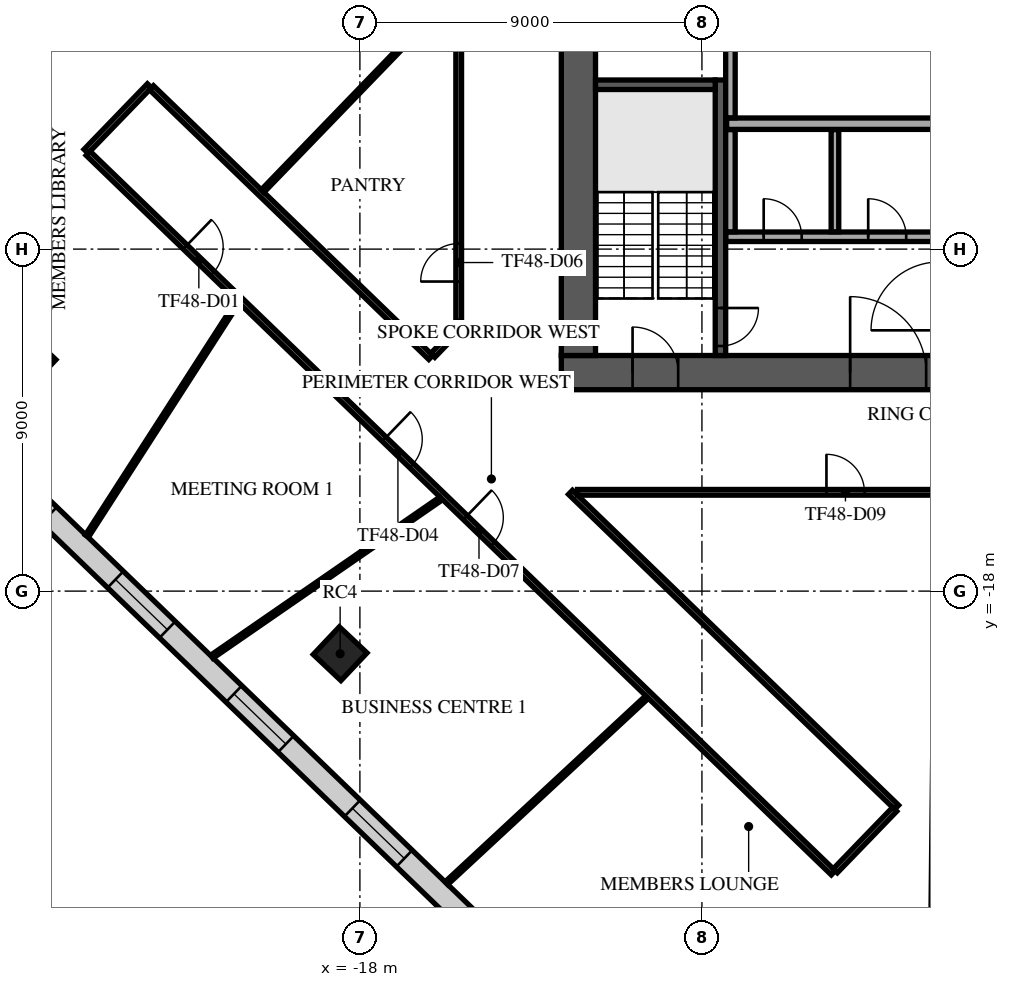
"""IFC4 building model, lengths in metres.
Left out: names, types, materials, properties, quantities, classifications, styles, units other than length and angle.
Written with IfcOpenShell. Run it as: python <this file> out.ifc"""

import sys

from ifc_helpers import new_model, si_unit, direction, frame, frame_2d, origin, origin_2d, place, context, subcontext, project, spatial, rectangle, extrude, element, fill, save


model = new_model("IFC4")
c1 = context("Model", 3, precision=1e-05, world=origin(), true_north=direction((0.0, 1.0)))
c2 = subcontext(c1, "Body", "Model", "MODEL_VIEW")
j1 = project(units=[si_unit("LENGTHUNIT", "METRE"), si_unit("PLANEANGLEUNIT", "RADIAN")], contexts=[c1])
p1 = place(None, origin())
s1 = spatial("IfcSite", under=j1, at=p1, CompositionType="ELEMENT")
p2 = place(p1, origin())
s2 = spatial("IfcBuilding", under=s1, at=p2, CompositionType="ELEMENT")
p3 = place(p2, frame((0.0, 0.0, 205.3)))
s3 = spatial("IfcBuildingStorey", under=s2, at=p3, CompositionType="ELEMENT", Elevation=205.3)
for number, where, z_axis, x_axis in (
    (1, (-26.706, -11.931, 0.0), (0.0, 0.0, 1.0), (0.686, 0.728, 0.0)),
    (2, (-18.52, -19.647, 0.0), (0.0, 0.0, 1.0), (0.686, 0.728, 0.0)),
):
    element("IfcColumn", number, at=place(p3, frame(where, z_axis=z_axis, x_axis=x_axis)), inside=s3, PredefinedType="COLUMN", context=c2, shape_type="SweptSolid", body=[
        extrude(rectangle(XDim=1.0, YDim=1.0, at=origin_2d()), origin(), (0.0, 0.0, 1.0), 4.0),
    ])
p4 = place(p3, frame((-12.7, -12.25, 0.0), z_axis=(0.0, 0.0, 1.0), x_axis=(1.0, 0.0, 0.0)))
e3 = element("IfcWall", 3, at=p4, inside=s3, PredefinedType="SHEAR", context=c2, shape_type="SweptSolid", body=[
    extrude(rectangle(XDim=25.4, YDim=0.9, at=frame_2d((12.7, 0.0))), origin(), (0.0, 0.0, 1.0), 3.62),
])
p5 = place(p4, frame((7.6, 0.0, 0.0)))
e4 = element("IfcOpeningElement", 4, at=p5, cuts=e3, PredefinedType="OPENING", context=c2, shape_type="SweptSolid", body=[
    extrude(rectangle(XDim=2.0, YDim=2.1, at=frame_2d((1.0, 1.05))), frame((0.0, 0.46, 0.0), z_axis=(0.0, -1.0, 0.0), x_axis=(1.0, 0.0, 0.0)), (0.0, 0.0, 1.0), 0.92),
])
p6 = place(p4, frame((17.725, 0.0, 0.0)))
e5 = element("IfcOpeningElement", 5, at=p6, cuts=e3, PredefinedType="OPENING", context=c2, shape_type="SweptSolid", body=[
    extrude(rectangle(XDim=1.2, YDim=2.1, at=frame_2d((0.6, 1.05))), frame((0.0, 0.46, 0.0), z_axis=(0.0, -1.0, 0.0), x_axis=(1.0, 0.0, 0.0)), (0.0, 0.0, 1.0), 0.92),
])
p7 = place(p4, frame((1.875, 0.0, 0.0)))
e6 = element("IfcOpeningElement", 6, at=p7, cuts=e3, PredefinedType="OPENING", context=c2, shape_type="SweptSolid", body=[
    extrude(rectangle(XDim=1.2, YDim=2.1, at=frame_2d((0.6, 1.05))), frame((0.0, 0.46, 0.0), z_axis=(0.0, -1.0, 0.0), x_axis=(1.0, 0.0, 0.0)), (0.0, 0.0, 1.0), 0.92),
])
p8 = place(p4, frame((22.325, 0.0, 0.0)))
e7 = element("IfcOpeningElement", 7, at=p8, cuts=e3, PredefinedType="OPENING", context=c2, shape_type="SweptSolid", body=[
    extrude(rectangle(XDim=1.2, YDim=2.1, at=frame_2d((0.6, 1.05))), frame((0.0, 0.46, 0.0), z_axis=(0.0, -1.0, 0.0), x_axis=(1.0, 0.0, 0.0)), (0.0, 0.0, 1.0), 0.92),
])
p9 = place(p3, frame((-12.25, -11.8, 0.0), z_axis=(0.0, 0.0, 1.0), x_axis=(0.0, 1.0, 0.0)))
e8 = element("IfcWall", 8, at=p9, inside=s3, PredefinedType="SHEAR", context=c2, shape_type="SweptSolid", body=[
    extrude(rectangle(XDim=23.6, YDim=0.9, at=frame_2d((11.8, 0.0))), origin(), (0.0, 0.0, 1.0), 3.62),
])
p10 = place(p9, frame((10.6, 0.0, 0.0)))
e9 = element("IfcOpeningElement", 9, at=p10, cuts=e8, PredefinedType="OPENING", context=c2, shape_type="SweptSolid", body=[
    extrude(rectangle(XDim=2.4, YDim=2.4, at=frame_2d((1.2, 1.2))), frame((0.0, 0.46, 0.0), z_axis=(0.0, -1.0, 0.0), x_axis=(1.0, 0.0, 0.0)), (0.0, 0.0, 1.0), 0.92),
])
p11 = place(p3, frame((-8.512, -4.55, 0.0), z_axis=(0.0, 0.0, 1.0), x_axis=(0.0, -1.0, 0.0)))
e10 = element("IfcWall", 10, at=p11, inside=s3, PredefinedType="SOLIDWALL", context=c2, shape_type="SweptSolid", body=[
    extrude(rectangle(XDim=7.25, YDim=0.275, at=frame_2d((3.625, 0.0))), origin(), (0.0, 0.0, 1.0), 3.62),
])
p12 = place(p11, frame((6.0, 0.0, 0.0)))
e11 = element("IfcOpeningElement", 11, at=p12, cuts=e10, PredefinedType="OPENING", context=c2, shape_type="SweptSolid", body=[
    extrude(rectangle(XDim=1.0, YDim=2.1, at=frame_2d((0.5, 1.05))), frame((0.0, 0.147, 0.0), z_axis=(0.0, -1.0, 0.0), x_axis=(1.0, 0.0, 0.0)), (0.0, 0.0, 1.0), 0.295),
])
p13 = place(p3, frame((-8.65, -4.675, 0.0), z_axis=(0.0, 0.0, 1.0), x_axis=(-1.0, 0.0, 0.0)))
e12 = element("IfcWall", 12, at=p13, inside=s3, PredefinedType="SOLIDWALL", context=c2, shape_type="SweptSolid", body=[
    extrude(rectangle(XDim=3.15, YDim=0.25, at=frame_2d((1.575, 0.0))), origin(), (0.0, 0.0, 1.0), 3.62),
])
p14 = place(p3, frame((-8.37, -8.675, 0.0), z_axis=(0.0, 0.0, 1.0), x_axis=(1.0, 0.0, 0.0)))
e13 = element("IfcWall", 13, at=p14, inside=s3, PredefinedType="PARTITIONING", context=c2, shape_type="SweptSolid", body=[
    extrude(rectangle(XDim=5.49, YDim=0.25, at=frame_2d((2.745, 0.0))), origin(), (0.0, 0.0, 1.0), 3.62),
])
p15 = place(p14, frame((0.995, 0.0, 0.0)))
e14 = element("IfcOpeningElement", 14, at=p15, cuts=e13, PredefinedType="OPENING", context=c2, shape_type="SweptSolid", body=[
    extrude(rectangle(XDim=1.0, YDim=2.1, at=frame_2d((0.5, 1.05))), frame((0.0, 0.135, 0.0), z_axis=(0.0, -1.0, 0.0), x_axis=(1.0, 0.0, 0.0)), (0.0, 0.0, 1.0), 0.27),
])
p16 = place(p14, frame((3.745, 0.0, 0.0)))
e15 = element("IfcOpeningElement", 15, at=p16, cuts=e13, PredefinedType="OPENING", context=c2, shape_type="SweptSolid", body=[
    extrude(rectangle(XDim=1.0, YDim=2.1, at=frame_2d((0.5, 1.05))), frame((0.0, 0.135, 0.0), z_axis=(0.0, -1.0, 0.0), x_axis=(1.0, 0.0, 0.0)), (0.0, 0.0, 1.0), 0.27),
])
p17 = place(p3, frame((-8.25, -8.545, 0.0), z_axis=(0.0, 0.0, 1.0), x_axis=(0.0, 1.0, 0.0)))
e16 = element("IfcWall", 16, at=p17, inside=s3, PredefinedType="PARTITIONING", context=c2, shape_type="SweptSolid", body=[
    extrude(rectangle(XDim=2.69, YDim=0.25, at=frame_2d((1.345, 0.0))), origin(), (0.0, 0.0, 1.0), 3.62),
])
p18 = place(p3, frame((-5.5, -8.545, 0.0), z_axis=(0.0, 0.0, 1.0), x_axis=(0.0, 1.0, 0.0)))
e17 = element("IfcWall", 17, at=p18, inside=s3, PredefinedType="PARTITIONING", context=c2, shape_type="SweptSolid", body=[
    extrude(rectangle(XDim=2.69, YDim=0.2, at=frame_2d((1.345, 0.0))), origin(), (0.0, 0.0, 1.0), 3.62),
])
p19 = place(p3, frame((-8.35, -5.7, 0.0), z_axis=(0.0, 0.0, 1.0), x_axis=(1.0, 0.0, 0.0)))
e18 = element("IfcWall", 18, at=p19, inside=s3, PredefinedType="PARTITIONING", context=c2, shape_type="SweptSolid", body=[
    extrude(rectangle(XDim=5.47, YDim=0.3, at=frame_2d((2.735, 0.0))), origin(), (0.0, 0.0, 1.0), 3.62),
])
p20 = place(p3, frame((-8.25, -5.545, 0.0), z_axis=(0.0, 0.0, 1.0), x_axis=(0.0, 1.0, 0.0)))
e19 = element("IfcWall", 19, at=p20, inside=s3, PredefinedType="PARTITIONING", context=c2, shape_type="SweptSolid", body=[
    extrude(rectangle(XDim=2.69, YDim=0.25, at=frame_2d((1.345, 0.0))), origin(), (0.0, 0.0, 1.0), 3.62),
])
p21 = place(p3, frame((-34.658, -7.819, 0.0), z_axis=(0.0, 0.0, 1.0), x_axis=(0.719340729741, -0.694657408034, 0.0)))
e20 = element("IfcWall", 20, at=p21, inside=s3, PredefinedType="STANDARD", context=c2, shape_type="SweptSolid", body=[
    extrude(rectangle(XDim=39.0, YDim=0.6, at=frame_2d((19.5, 0.0))), origin(), (0.0, 0.0, 1.0), 3.62),
])
p22 = place(p21, frame((1.217, 0.0, 0.9)))
e21 = element("IfcOpeningElement", 21, at=p22, cuts=e20, PredefinedType="OPENING", context=c2, shape_type="SweptSolid", body=[
    extrude(rectangle(XDim=1.9, YDim=2.1, at=frame_2d((0.95, 1.05))), frame((0.0, 0.31, 0.0), z_axis=(0.0, -1.0, 0.0), x_axis=(1.0, 0.0, 0.0)), (0.0, 0.0, 1.0), 0.62),
])
p23 = place(p21, frame((5.55, 0.0, 0.9)))
e22 = element("IfcOpeningElement", 22, at=p23, cuts=e20, PredefinedType="OPENING", context=c2, shape_type="SweptSolid", body=[
    extrude(rectangle(XDim=1.9, YDim=2.1, at=frame_2d((0.95, 1.05))), frame((0.0, 0.31, 0.0), z_axis=(0.0, -1.0, 0.0), x_axis=(1.0, 0.0, 0.0)), (0.0, 0.0, 1.0), 0.62),
])
p24 = place(p21, frame((9.883, 0.0, 0.9)))
e23 = element("IfcOpeningElement", 23, at=p24, cuts=e20, PredefinedType="OPENING", context=c2, shape_type="SweptSolid", body=[
    extrude(rectangle(XDim=1.9, YDim=2.1, at=frame_2d((0.95, 1.05))), frame((0.0, 0.31, 0.0), z_axis=(0.0, -1.0, 0.0), x_axis=(1.0, 0.0, 0.0)), (0.0, 0.0, 1.0), 0.62),
])
p25 = place(p21, frame((14.217, 0.0, 0.9)))
e24 = element("IfcOpeningElement", 24, at=p25, cuts=e20, PredefinedType="OPENING", context=c2, shape_type="SweptSolid", body=[
    extrude(rectangle(XDim=1.9, YDim=2.1, at=frame_2d((0.95, 1.05))), frame((0.0, 0.31, 0.0), z_axis=(0.0, -1.0, 0.0), x_axis=(1.0, 0.0, 0.0)), (0.0, 0.0, 1.0), 0.62),
])
p26 = place(p21, frame((18.55, 0.0, 0.9)))
e25 = element("IfcOpeningElement", 25, at=p26, cuts=e20, PredefinedType="OPENING", context=c2, shape_type="SweptSolid", body=[
    extrude(rectangle(XDim=1.9, YDim=2.1, at=frame_2d((0.95, 1.05))), frame((0.0, 0.31, 0.0), z_axis=(0.0, -1.0, 0.0), x_axis=(1.0, 0.0, 0.0)), (0.0, 0.0, 1.0), 0.62),
])
p27 = place(p21, frame((22.883, 0.0, 0.9)))
e26 = element("IfcOpeningElement", 26, at=p27, cuts=e20, PredefinedType="OPENING", context=c2, shape_type="SweptSolid", body=[
    extrude(rectangle(XDim=1.9, YDim=2.1, at=frame_2d((0.95, 1.05))), frame((0.0, 0.31, 0.0), z_axis=(0.0, -1.0, 0.0), x_axis=(1.0, 0.0, 0.0)), (0.0, 0.0, 1.0), 0.62),
])
p28 = place(p21, frame((27.217, 0.0, 0.9)))
e27 = element("IfcOpeningElement", 27, at=p28, cuts=e20, PredefinedType="OPENING", context=c2, shape_type="SweptSolid", body=[
    extrude(rectangle(XDim=1.9, YDim=2.1, at=frame_2d((0.95, 1.05))), frame((0.0, 0.31, 0.0), z_axis=(0.0, -1.0, 0.0), x_axis=(1.0, 0.0, 0.0)), (0.0, 0.0, 1.0), 0.62),
])
p29 = place(p21, frame((31.55, 0.0, 0.9)))
e28 = element("IfcOpeningElement", 28, at=p29, cuts=e20, PredefinedType="OPENING", context=c2, shape_type="SweptSolid", body=[
    extrude(rectangle(XDim=1.9, YDim=2.1, at=frame_2d((0.95, 1.05))), frame((0.0, 0.31, 0.0), z_axis=(0.0, -1.0, 0.0), x_axis=(1.0, 0.0, 0.0)), (0.0, 0.0, 1.0), 0.62),
])
p30 = place(p21, frame((35.883, 0.0, 0.9)))
e29 = element("IfcOpeningElement", 29, at=p30, cuts=e20, PredefinedType="OPENING", context=c2, shape_type="SweptSolid", body=[
    extrude(rectangle(XDim=1.9, YDim=2.1, at=frame_2d((0.95, 1.05))), frame((0.0, 0.31, 0.0), z_axis=(0.0, -1.0, 0.0), x_axis=(1.0, 0.0, 0.0)), (0.0, 0.0, 1.0), 0.62),
])
p31 = place(p3, frame((-25.205, -6.427, 0.0), z_axis=(0.0, 0.0, 1.0), x_axis=(0.694688923552, 0.719310294305, 0.0)))
e30 = element("IfcWall", 30, at=p31, inside=s3, PredefinedType="PARTITIONING", context=c2, shape_type="SweptSolid", body=[
    extrude(rectangle(XDim=2.4, YDim=0.15, at=frame_2d((1.2, 0.0))), origin(), (0.0, 0.0, 1.0), 3.62),
])
p32 = place(p3, frame((-25.151, -6.479, 0.0), z_axis=(0.0, 0.0, 1.0), x_axis=(0.719341269489, -0.694656849106, 0.0)))
e31 = element("IfcWall", 31, at=p32, inside=s3, PredefinedType="PARTITIONING", context=c2, shape_type="SweptSolid", body=[
    extrude(rectangle(XDim=27.258, YDim=0.15, at=frame_2d((13.629, 0.0))), origin(), (0.0, 0.0, 1.0), 3.17),
])
p33 = place(p32, frame((3.55, 0.0, 0.0)))
e32 = element("IfcOpeningElement", 32, at=p33, cuts=e31, PredefinedType="OPENING", context=c2, shape_type="SweptSolid", body=[
    extrude(rectangle(XDim=1.0, YDim=2.1, at=frame_2d((0.5, 1.05))), frame((0.0, 0.085, 0.0), z_axis=(0.0, -1.0, 0.0), x_axis=(1.0, 0.0, 0.0)), (0.0, 0.0, 1.0), 0.17),
])
p34 = place(p32, frame((10.832, 0.0, 0.0)))
e33 = element("IfcOpeningElement", 33, at=p34, cuts=e31, PredefinedType="OPENING", context=c2, shape_type="SweptSolid", body=[
    extrude(rectangle(XDim=1.0, YDim=2.1, at=frame_2d((0.5, 1.05))), frame((0.0, 0.085, 0.0), z_axis=(0.0, -1.0, 0.0), x_axis=(1.0, 0.0, 0.0)), (0.0, 0.0, 1.0), 0.17),
])
p35 = place(p32, frame((13.797, 0.0, 0.0)))
e34 = element("IfcOpeningElement", 34, at=p35, cuts=e31, PredefinedType="OPENING", context=c2, shape_type="SweptSolid", body=[
    extrude(rectangle(XDim=1.0, YDim=2.1, at=frame_2d((0.5, 1.05))), frame((0.0, 0.085, 0.0), z_axis=(0.0, -1.0, 0.0), x_axis=(1.0, 0.0, 0.0)), (0.0, 0.0, 1.0), 0.17),
])
p36 = place(p3, frame((-23.484, -4.753, 0.0), z_axis=(0.0, 0.0, 1.0), x_axis=(0.719330221059, -0.694668289956, 0.0)))
e35 = element("IfcWall", 35, at=p36, inside=s3, PredefinedType="PARTITIONING", context=c2, shape_type="SweptSolid", body=[
    extrude(rectangle(XDim=10.216, YDim=0.15, at=frame_2d((5.108, 0.0))), origin(), (0.0, 0.0, 1.0), 3.17),
])
p37 = place(p3, frame((-16.083, -11.796, 0.0), z_axis=(0.0, 0.0, 1.0), x_axis=(0.694957895629, 0.719050431682, 0.0)))
e36 = element("IfcWall", 36, at=p37, inside=s3, PredefinedType="PARTITIONING", context=c2, shape_type="SweptSolid", body=[
    extrude(rectangle(XDim=0.983, YDim=0.15, at=frame_2d((0.491, 0.0))), origin(), (0.0, 0.0, 1.0), 3.17),
])
p38 = place(p3, frame((-15.4, -10.903, 0.0), z_axis=(0.0, 0.0, 1.0), x_axis=(0.0, 1.0, 0.0)))
e37 = element("IfcWall", 37, at=p38, inside=s3, PredefinedType="PARTITIONING", context=c2, shape_type="SweptSolid", body=[
    extrude(rectangle(XDim=19.403, YDim=0.15, at=frame_2d((9.702, 0.0))), origin(), (0.0, 0.0, 1.0), 3.17),
])
p39 = place(p38, frame((15.032, 0.0, 0.0)))
e38 = element("IfcOpeningElement", 38, at=p39, cuts=e37, PredefinedType="OPENING", context=c2, shape_type="SweptSolid", body=[
    extrude(rectangle(XDim=1.0, YDim=2.1, at=frame_2d((0.5, 1.05))), frame((0.0, 0.085, 0.0), z_axis=(0.0, -1.0, 0.0), x_axis=(1.0, 0.0, 0.0)), (0.0, 0.0, 1.0), 0.17),
])
p40 = place(p38, frame((1.05, 0.0, 0.0)))
e39 = element("IfcOpeningElement", 39, at=p40, cuts=e37, PredefinedType="OPENING", context=c2, shape_type="SweptSolid", body=[
    extrude(rectangle(XDim=1.0, YDim=2.1, at=frame_2d((0.5, 1.05))), frame((0.0, 0.085, 0.0), z_axis=(0.0, -1.0, 0.0), x_axis=(1.0, 0.0, 0.0)), (0.0, 0.0, 1.0), 0.17),
])
p41 = place(p3, frame((-12.459, -15.4, 0.0), z_axis=(0.0, 0.0, 1.0), x_axis=(0.719357740032, -0.694639792883, 0.0)))
e40 = element("IfcWall", 40, at=p41, inside=s3, PredefinedType="PARTITIONING", context=c2, shape_type="SweptSolid", body=[
    extrude(rectangle(XDim=11.931, YDim=0.15, at=frame_2d((5.966, 0.0))), origin(), (0.0, 0.0, 1.0), 3.17),
])
p42 = place(p3, frame((-12.273, -15.4, 0.0), z_axis=(0.0, 0.0, 1.0), x_axis=(1.0, 0.0, 0.0)))
e41 = element("IfcWall", 41, at=p42, inside=s3, PredefinedType="PARTITIONING", context=c2, shape_type="SweptSolid", body=[
    extrude(rectangle(XDim=18.423, YDim=0.15, at=frame_2d((9.212, 0.0))), origin(), (0.0, 0.0, 1.0), 3.17),
])
p43 = place(p42, frame((6.55, 0.0, 0.0)))
e42 = element("IfcOpeningElement", 42, at=p43, cuts=e41, PredefinedType="OPENING", context=c2, shape_type="SweptSolid", body=[
    extrude(rectangle(XDim=1.0, YDim=2.1, at=frame_2d((0.5, 1.05))), frame((0.0, 0.085, 0.0), z_axis=(0.0, -1.0, 0.0), x_axis=(1.0, 0.0, 0.0)), (0.0, 0.0, 1.0), 0.17),
])
p44 = place(p3, frame((-5.491, -25.36, 0.0), z_axis=(0.0, 0.0, 1.0), x_axis=(0.694737811608, 0.719263076435, 0.0)))
e43 = element("IfcWall", 43, at=p44, inside=s3, PredefinedType="PARTITIONING", context=c2, shape_type="SweptSolid", body=[
    extrude(rectangle(XDim=2.25, YDim=0.15, at=frame_2d((1.125, 0.0))), origin(), (0.0, 0.0, 1.0), 3.17),
])
p45 = place(p3, frame((-25.182, -16.55, 0.0), z_axis=(0.0, 0.0, 1.0), x_axis=(0.541323767844, 0.84081423535, 0.0)))
e44 = element("IfcWall", 44, at=p45, inside=s3, PredefinedType="PARTITIONING", context=c2, shape_type="SweptSolid", body=[
    extrude(rectangle(XDim=7.321, YDim=0.1, at=frame_2d((3.661, 0.0))), origin(), (0.0, 0.0, 1.0), 2.97),
])
p46 = place(p3, frame((-21.894, -19.725, 0.0), z_axis=(0.0, 0.0, 1.0), x_axis=(0.822893560883, 0.568195553887, 0.0)))
e45 = element("IfcWall", 45, at=p46, inside=s3, PredefinedType="PARTITIONING", context=c2, shape_type="SweptSolid", body=[
    extrude(rectangle(XDim=7.324, YDim=0.1, at=frame_2d((3.662, 0.0))), origin(), (0.0, 0.0, 1.0), 2.97),
])
p47 = place(p3, frame((-20.56, -7.472, 0.0), z_axis=(0.0, 0.0, 1.0), x_axis=(0.694721601458, 0.719278733502, 0.0)))
e46 = element("IfcWall", 46, at=p47, inside=s3, PredefinedType="PARTITIONING", context=c2, shape_type="SweptSolid", body=[
    extrude(rectangle(XDim=7.267, YDim=0.1, at=frame_2d((3.634, 0.0))), origin(), (0.0, 0.0, 1.0), 3.17),
])
p48 = place(p3, frame((-15.722, -25.685, 0.0), z_axis=(0.0, 0.0, 1.0), x_axis=(0.732967408974, 0.680263755747, 0.0)))
e47 = element("IfcWall", 47, at=p48, inside=s3, PredefinedType="PARTITIONING", context=c2, shape_type="SweptSolid", body=[
    extrude(rectangle(XDim=7.199, YDim=0.1, at=frame_2d((3.599, 0.0))), origin(), (0.0, 0.0, 1.0), 2.97),
])
p49 = place(p3, frame((-2.975, -31.21, 0.0), z_axis=(0.0, 0.0, 1.0), x_axis=(0.010798774474, 0.999941691535, 0.0)))
e48 = element("IfcWall", 48, at=p49, inside=s3, PredefinedType="PARTITIONING", context=c2, shape_type="SweptSolid", body=[
    extrude(rectangle(XDim=15.735, YDim=0.1, at=frame_2d((7.868, 0.0))), origin(), (0.0, 0.0, 1.0), 2.97),
])
p50 = place(p5, origin())
e49 = element("IfcDoor", 49, at=p50, inside=s3, OperationType="SINGLE_SWING_LEFT", PredefinedType="DOOR", context=c2, shape_type="SweptSolid", body=[
    extrude(rectangle(XDim=2.0, YDim=2.1, at=frame_2d((1.0, 1.05))), frame((0.0, 0.025, 0.0), z_axis=(0.0, -1.0, 0.0), x_axis=(1.0, 0.0, 0.0)), (0.0, 0.0, 1.0), 0.05),
])
fill(e4, e49)
p51 = place(p7, origin())
e50 = element("IfcDoor", 50, at=p51, inside=s3, OperationType="SINGLE_SWING_LEFT", PredefinedType="DOOR", context=c2, shape_type="SweptSolid", body=[
    extrude(rectangle(XDim=1.2, YDim=2.1, at=frame_2d((0.6, 1.05))), frame((0.0, 0.025, 0.0), z_axis=(0.0, -1.0, 0.0), x_axis=(1.0, 0.0, 0.0)), (0.0, 0.0, 1.0), 0.05),
])
fill(e6, e50)
p52 = place(p12, origin())
e51 = element("IfcDoor", 51, at=p52, inside=s3, OperationType="SINGLE_SWING_LEFT", PredefinedType="DOOR", context=c2, shape_type="SweptSolid", body=[
    extrude(rectangle(XDim=1.0, YDim=2.1, at=frame_2d((0.5, 1.05))), frame((0.0, 0.025, 0.0), z_axis=(0.0, -1.0, 0.0), x_axis=(1.0, 0.0, 0.0)), (0.0, 0.0, 1.0), 0.05),
])
fill(e11, e51)
p53 = place(p15, origin())
e52 = element("IfcDoor", 52, at=p53, inside=s3, OperationType="SINGLE_SWING_LEFT", PredefinedType="DOOR", context=c2, shape_type="SweptSolid", body=[
    extrude(rectangle(XDim=1.0, YDim=2.1, at=frame_2d((0.5, 1.05))), frame((0.0, 0.025, 0.0), z_axis=(0.0, -1.0, 0.0), x_axis=(1.0, 0.0, 0.0)), (0.0, 0.0, 1.0), 0.05),
])
fill(e14, e52)
p54 = place(p16, origin())
e53 = element("IfcDoor", 53, at=p54, inside=s3, OperationType="SINGLE_SWING_LEFT", PredefinedType="DOOR", context=c2, shape_type="SweptSolid", body=[
    extrude(rectangle(XDim=1.0, YDim=2.1, at=frame_2d((0.5, 1.05))), frame((0.0, 0.025, 0.0), z_axis=(0.0, -1.0, 0.0), x_axis=(1.0, 0.0, 0.0)), (0.0, 0.0, 1.0), 0.05),
])
fill(e15, e53)
p55 = place(p25, origin())
e54 = element("IfcWindow", 54, at=p55, inside=s3, PartitioningType="SINGLE_PANEL", PredefinedType="WINDOW", context=c2, shape_type="SweptSolid", body=[
    extrude(rectangle(XDim=1.9, YDim=2.1, at=frame_2d((0.95, 1.05))), frame((0.0, 0.03, 0.0), z_axis=(0.0, -1.0, 0.0), x_axis=(1.0, 0.0, 0.0)), (0.0, 0.0, 1.0), 0.06),
])
fill(e24, e54)
p56 = place(p26, origin())
e55 = element("IfcWindow", 55, at=p56, inside=s3, PartitioningType="SINGLE_PANEL", PredefinedType="WINDOW", context=c2, shape_type="SweptSolid", body=[
    extrude(rectangle(XDim=1.9, YDim=2.1, at=frame_2d((0.95, 1.05))), frame((0.0, 0.03, 0.0), z_axis=(0.0, -1.0, 0.0), x_axis=(1.0, 0.0, 0.0)), (0.0, 0.0, 1.0), 0.06),
])
fill(e25, e55)
p57 = place(p27, origin())
e56 = element("IfcWindow", 56, at=p57, inside=s3, PartitioningType="SINGLE_PANEL", PredefinedType="WINDOW", context=c2, shape_type="SweptSolid", body=[
    extrude(rectangle(XDim=1.9, YDim=2.1, at=frame_2d((0.95, 1.05))), frame((0.0, 0.03, 0.0), z_axis=(0.0, -1.0, 0.0), x_axis=(1.0, 0.0, 0.0)), (0.0, 0.0, 1.0), 0.06),
])
fill(e26, e56)
p58 = place(p33, frame((1.0, 0.0, 0.0), z_axis=(0.0, 0.0, 1.0), x_axis=(-1.0, 0.0, 0.0)))
e57 = element("IfcDoor", 57, at=p58, inside=s3, OperationType="SINGLE_SWING_LEFT", PredefinedType="DOOR", context=c2, shape_type="SweptSolid", body=[
    extrude(rectangle(XDim=1.0, YDim=2.1, at=frame_2d((0.5, 1.05))), frame((0.0, 0.025, 0.0), z_axis=(0.0, -1.0, 0.0), x_axis=(1.0, 0.0, 0.0)), (0.0, 0.0, 1.0), 0.05),
])
fill(e32, e57)
p59 = place(p34, frame((1.0, 0.0, 0.0), z_axis=(0.0, 0.0, 1.0), x_axis=(-1.0, 0.0, 0.0)))
e58 = element("IfcDoor", 58, at=p59, inside=s3, OperationType="SINGLE_SWING_RIGHT", PredefinedType="DOOR", context=c2, shape_type="SweptSolid", body=[
    extrude(rectangle(XDim=1.0, YDim=2.1, at=frame_2d((0.5, 1.05))), frame((0.0, 0.025, 0.0), z_axis=(0.0, -1.0, 0.0), x_axis=(1.0, 0.0, 0.0)), (0.0, 0.0, 1.0), 0.05),
])
fill(e33, e58)
p60 = place(p40, origin())
e59 = element("IfcDoor", 59, at=p60, inside=s3, OperationType="SINGLE_SWING_RIGHT", PredefinedType="DOOR", context=c2, shape_type="SweptSolid", body=[
    extrude(rectangle(XDim=1.0, YDim=2.1, at=frame_2d((0.5, 1.05))), frame((0.0, 0.025, 0.0), z_axis=(0.0, -1.0, 0.0), x_axis=(1.0, 0.0, 0.0)), (0.0, 0.0, 1.0), 0.05),
])
fill(e39, e59)
p61 = place(p35, frame((1.0, 0.0, 0.0), z_axis=(0.0, 0.0, 1.0), x_axis=(-1.0, 0.0, 0.0)))
e60 = element("IfcDoor", 60, at=p61, inside=s3, OperationType="SINGLE_SWING_RIGHT", PredefinedType="DOOR", context=c2, shape_type="SweptSolid", body=[
    extrude(rectangle(XDim=1.0, YDim=2.1, at=frame_2d((0.5, 1.05))), frame((0.0, 0.025, 0.0), z_axis=(0.0, -1.0, 0.0), x_axis=(1.0, 0.0, 0.0)), (0.0, 0.0, 1.0), 0.05),
])
fill(e34, e60)
p62 = place(p43, frame((1.0, 0.0, 0.0), z_axis=(0.0, 0.0, 1.0), x_axis=(-1.0, 0.0, 0.0)))
e61 = element("IfcDoor", 61, at=p62, inside=s3, OperationType="SINGLE_SWING_LEFT", PredefinedType="DOOR", context=c2, shape_type="SweptSolid", body=[
    extrude(rectangle(XDim=1.0, YDim=2.1, at=frame_2d((0.5, 1.05))), frame((0.0, 0.025, 0.0), z_axis=(0.0, -1.0, 0.0), x_axis=(1.0, 0.0, 0.0)), (0.0, 0.0, 1.0), 0.05),
])
fill(e42, e61)
save(model, sys.argv[1])
